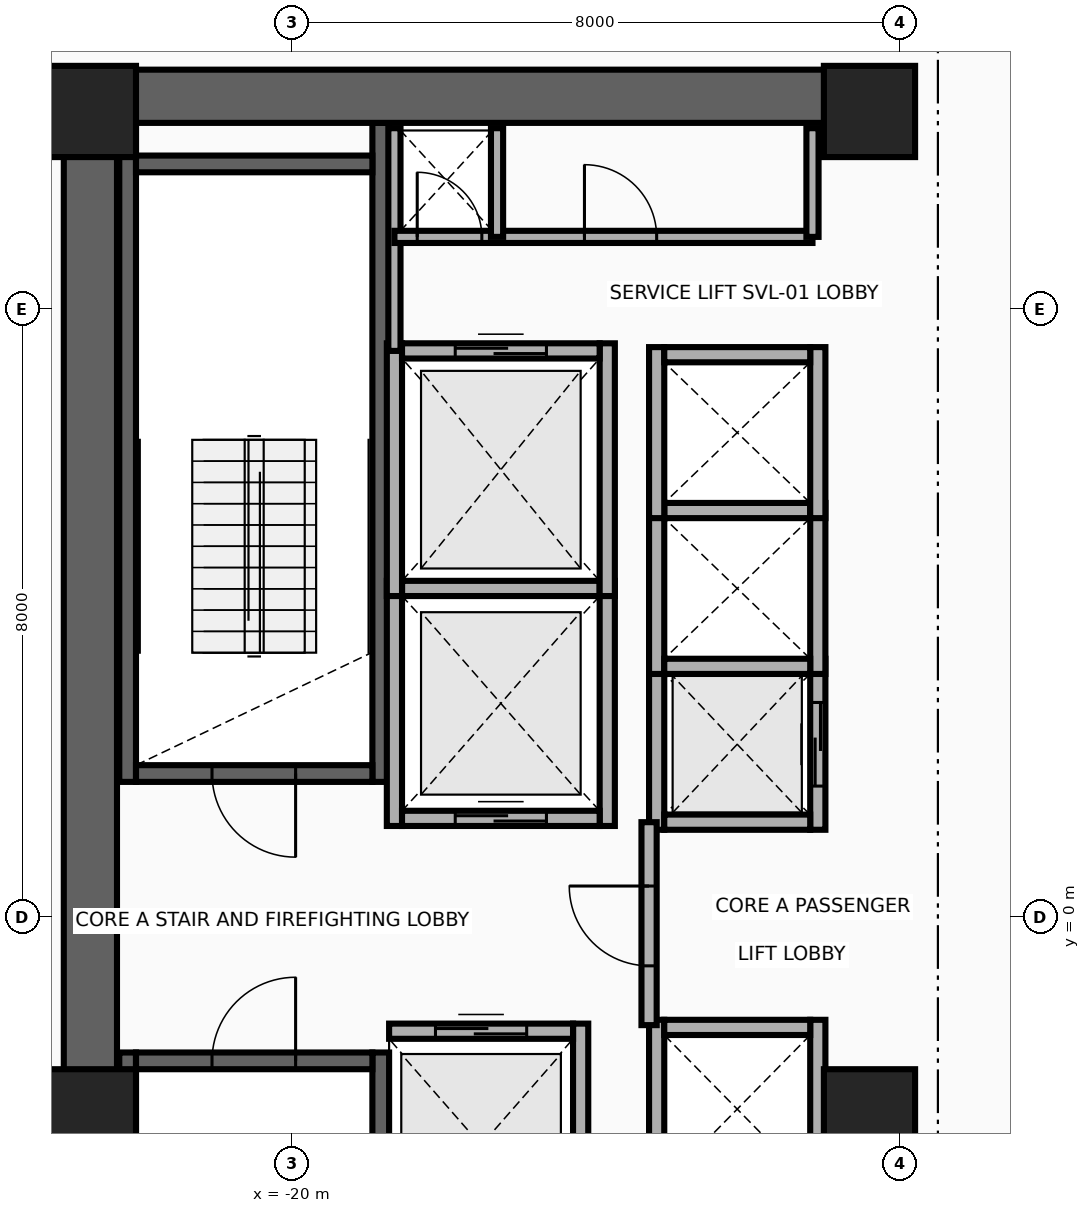
"""IFC4 building model, lengths in metres.
Left out: names, types, materials, properties, quantities, classifications, styles, units other than length and angle.
Written with IfcOpenShell. Run it as: python <this file> out.ifc"""

import sys

from ifc_helpers import new_model, si_unit, direction, frame, frame_2d, origin, origin_2d, place, context, subcontext, project, spatial, rectangle, extrude, source, transform, mapped, element, fill, save


model = new_model("IFC4")
c1 = context("Model", 3, precision=1e-05, world=origin(), true_north=direction((0.0, 1.0)))
c2 = subcontext(c1, "Body", "Model", "MODEL_VIEW")
j1 = project(units=[si_unit("LENGTHUNIT", "METRE"), si_unit("PLANEANGLEUNIT", "RADIAN")], contexts=[c1])
p1 = place(None, origin())
s1 = spatial("IfcSite", under=j1, at=p1, CompositionType="ELEMENT")
p2 = place(p1, origin())
s2 = spatial("IfcBuilding", under=s1, at=p2, CompositionType="ELEMENT")
p3 = place(p2, frame((0.0, 0.0, 142.7)))
s3 = spatial("IfcBuildingStorey", under=s2, at=p3, CompositionType="ELEMENT", Elevation=142.7)
for number, where, z_axis, x_axis in (
    (1, (-22.16, 1.78, 0.0), (0.0, 0.0, 1.0), (0.0, 1.0, 0.0)),
    (2, (-18.83, 1.78, 0.0), (0.0, 0.0, 1.0), (0.0, 1.0, 0.0)),
):
    element("IfcWall", number, at=place(p3, frame(where, z_axis=z_axis, x_axis=x_axis)), inside=s3, PredefinedType="SHEAR", context=c2, shape_type="SweptSolid", body=[
        extrude(rectangle(XDim=8.67, YDim=0.22, at=frame_2d((4.335, 0.0))), origin(), (0.0, 0.0, 1.0), 3.46),
    ])
p4 = place(p3, frame((-22.05, 1.89, 0.0), z_axis=(0.0, 0.0, 1.0), x_axis=(1.0, 0.0, 0.0)))
e3 = element("IfcWall", 3, at=p4, inside=s3, PredefinedType="SHEAR", context=c2, shape_type="SweptSolid", body=[
    extrude(rectangle(XDim=3.11, YDim=0.22, at=frame_2d((1.555, 0.0))), origin(), (0.0, 0.0, 1.0), 3.46),
])
p5 = place(p4, frame((1.0, 0.0, 0.0)))
e4 = element("IfcOpeningElement", 4, at=p5, cuts=e3, PredefinedType="OPENING", context=c2, shape_type="SweptSolid", body=[
    extrude(rectangle(XDim=1.1, YDim=2.15, at=frame_2d((0.55, 1.075))), frame((0.0, 0.125, 0.0), z_axis=(0.0, -1.0, 0.0), x_axis=(1.0, 0.0, 0.0)), (0.0, 0.0, 1.0), 0.25),
])
p6 = place(p3, frame((-22.05, 9.91, 0.0), z_axis=(0.0, 0.0, 1.0), x_axis=(1.0, 0.0, 0.0)))
e5 = element("IfcWall", 5, at=p6, inside=s3, PredefinedType="SHEAR", context=c2, shape_type="SweptSolid", body=[
    extrude(rectangle(XDim=3.11, YDim=0.22, at=frame_2d((1.555, 0.0))), origin(), (0.0, 0.0, 1.0), 3.46),
])
for number, where, z_axis, x_axis in (
    (6, (-22.16, -10.45, 0.0), (0.0, 0.0, 1.0), (0.0, 1.0, 0.0)),
    (7, (-18.83, -10.45, 0.0), (0.0, 0.0, 1.0), (0.0, 1.0, 0.0)),
):
    element("IfcWall", number, at=place(p3, frame(where, z_axis=z_axis, x_axis=x_axis)), inside=s3, PredefinedType="SHEAR", context=c2, shape_type="SweptSolid", body=[
        extrude(rectangle(XDim=8.67, YDim=0.22, at=frame_2d((4.335, 0.0))), origin(), (0.0, 0.0, 1.0), 3.46),
    ])
p7 = place(p3, frame((-22.05, -1.89, 0.0), z_axis=(0.0, 0.0, 1.0), x_axis=(1.0, 0.0, 0.0)))
e8 = element("IfcWall", 8, at=p7, inside=s3, PredefinedType="SHEAR", context=c2, shape_type="SweptSolid", body=[
    extrude(rectangle(XDim=3.11, YDim=0.22, at=frame_2d((1.555, 0.0))), origin(), (0.0, 0.0, 1.0), 3.46),
])
p8 = place(p7, frame((1.0, 0.0, 0.0)))
e9 = element("IfcOpeningElement", 9, at=p8, cuts=e8, PredefinedType="OPENING", context=c2, shape_type="SweptSolid", body=[
    extrude(rectangle(XDim=1.1, YDim=2.15, at=frame_2d((0.55, 1.075))), frame((0.0, 0.125, 0.0), z_axis=(0.0, -1.0, 0.0), x_axis=(1.0, 0.0, 0.0)), (0.0, 0.0, 1.0), 0.25),
])
p9 = place(p3, frame((-22.65, -11.15, 0.0), z_axis=(0.0, 0.0, 1.0), x_axis=(0.0, 1.0, 0.0)))
e10 = element("IfcWall", 10, at=p9, inside=s3, PredefinedType="SHEAR", context=c2, shape_type="SweptSolid", body=[
    extrude(rectangle(XDim=22.3, YDim=0.7, at=frame_2d((11.15, 0.0))), origin(), (0.0, 0.0, 1.0), 3.46),
])
p10 = place(p3, frame((-22.65, 10.8, 0.0), z_axis=(0.0, 0.0, 1.0), x_axis=(1.0, 0.0, 0.0)))
e11 = element("IfcWall", 11, at=p10, inside=s3, PredefinedType="SHEAR", context=c2, shape_type="SweptSolid", body=[
    extrude(rectangle(XDim=10.25, YDim=0.7, at=frame_2d((5.125, 0.0))), origin(), (0.0, 0.0, 1.0), 3.46),
])
m1 = source(origin(), c2, "Body", "SweptSolid", [
    extrude(rectangle(XDim=1.2, YDim=1.2, at=origin_2d()), origin(), (0.0, 0.0, 1.0), 3.7),
])
for number, where, z_axis, x_axis in (
    (12, (-22.65, -2.6, 0.0), (0.0, 0.0, 1.0), (1.0, 0.0, 0.0)),
    (13, (-12.4, -2.6, 0.0), (0.0, 0.0, 1.0), (1.0, 0.0, 0.0)),
    (14, (-22.65, 10.6, 0.0), (0.0, 0.0, 1.0), (1.0, 0.0, 0.0)),
    (15, (-12.4, 10.6, 0.0), (0.0, 0.0, 1.0), (1.0, 0.0, 0.0)),
):
    element("IfcColumn", number, at=place(p3, frame(where, z_axis=z_axis, x_axis=x_axis)), inside=s3, PredefinedType="COLUMN", context=c2, shape_type="MappedRepresentation", body=[
        mapped(m1, transform((0.0, 0.0, 0.0), x_axis=(1.0, 0.0, 0.0), y_axis=(0.0, 1.0, 0.0), z_axis=(0.0, 0.0, 1.0), scale=1.0)),
    ])
for number, where, z_axis, x_axis in (
    (16, (-18.65, 1.2, 0.0), (0.0, 0.0, 1.0), (0.0, 1.0, 0.0)),
    (17, (-15.85, 1.2, 0.0), (0.0, 0.0, 1.0), (0.0, 1.0, 0.0)),
):
    element("IfcWall", number, at=place(p3, frame(where, z_axis=z_axis, x_axis=x_axis)), inside=s3, PredefinedType="MOVABLE", context=c2, shape_type="SweptSolid", body=[
        extrude(rectangle(XDim=3.225, YDim=0.2, at=frame_2d((1.613, 0.0))), origin(), (0.0, 0.0, 1.0), 3.46),
    ])
p11 = place(p3, frame((-18.55, 1.3, 0.0), z_axis=(0.0, 0.0, 1.0), x_axis=(1.0, 0.0, 0.0)))
e18 = element("IfcWall", 18, at=p11, inside=s3, PredefinedType="MOVABLE", context=c2, shape_type="SweptSolid", body=[
    extrude(rectangle(XDim=2.6, YDim=0.2, at=frame_2d((1.3, 0.0))), origin(), (0.0, 0.0, 1.0), 3.46),
])
p12 = place(p11, frame((0.7, 0.0, 0.0)))
e19 = element("IfcOpeningElement", 19, at=p12, cuts=e18, PredefinedType="OPENING", context=c2, shape_type="SweptSolid", body=[
    extrude(rectangle(XDim=1.2, YDim=2.1, at=frame_2d((0.6, 1.05))), frame((0.0, 0.115, 0.0), z_axis=(0.0, -1.0, 0.0), x_axis=(1.0, 0.0, 0.0)), (0.0, 0.0, 1.0), 0.23),
])
p13 = place(p3, frame((-18.55, 4.325, 0.0), z_axis=(0.0, 0.0, 1.0), x_axis=(1.0, 0.0, 0.0)))
e20 = element("IfcWall", 20, at=p13, inside=s3, PredefinedType="MOVABLE", context=c2, shape_type="SweptSolid", body=[
    extrude(rectangle(XDim=2.6, YDim=0.2, at=frame_2d((1.3, 0.0))), origin(), (0.0, 0.0, 1.0), 3.46),
])
p14 = place(p3, frame((-16.2, -4.6, 0.0), z_axis=(0.0, 0.0, 1.0), x_axis=(0.0, 1.0, 0.0)))
e21 = element("IfcWall", 21, at=p14, inside=s3, PredefinedType="MOVABLE", context=c2, shape_type="SweptSolid", body=[
    extrude(rectangle(XDim=3.2, YDim=0.2, at=frame_2d((1.6, 0.0))), origin(), (0.0, 0.0, 1.0), 3.46),
])
p15 = place(p3, frame((-18.72, -1.5, 0.0), z_axis=(0.0, 0.0, 1.0), x_axis=(1.0, 0.0, 0.0)))
e22 = element("IfcWall", 22, at=p15, inside=s3, PredefinedType="MOVABLE", context=c2, shape_type="SweptSolid", body=[
    extrude(rectangle(XDim=2.42, YDim=0.2, at=frame_2d((1.21, 0.0))), origin(), (0.0, 0.0, 1.0), 3.46),
])
p16 = place(p15, frame((0.61, 0.0, 0.0)))
e23 = element("IfcOpeningElement", 23, at=p16, cuts=e22, PredefinedType="OPENING", context=c2, shape_type="SweptSolid", body=[
    extrude(rectangle(XDim=1.2, YDim=2.1, at=frame_2d((0.6, 1.05))), frame((0.0, 0.115, 0.0), z_axis=(0.0, -1.0, 0.0), x_axis=(1.0, 0.0, 0.0)), (0.0, 0.0, 1.0), 0.23),
])
for number, where, z_axis, x_axis in (
    (24, (-18.65, 4.225, 0.0), (0.0, 0.0, 1.0), (0.0, 1.0, 0.0)),
    (25, (-15.85, 4.225, 0.0), (0.0, 0.0, 1.0), (0.0, 1.0, 0.0)),
):
    element("IfcWall", number, at=place(p3, frame(where, z_axis=z_axis, x_axis=x_axis)), inside=s3, PredefinedType="MOVABLE", context=c2, shape_type="SweptSolid", body=[
        extrude(rectangle(XDim=3.325, YDim=0.2, at=frame_2d((1.663, 0.0))), origin(), (0.0, 0.0, 1.0), 3.46),
    ])
p17 = place(p3, frame((-18.55, 7.45, 0.0), z_axis=(0.0, 0.0, 1.0), x_axis=(1.0, 0.0, 0.0)))
e26 = element("IfcWall", 26, at=p17, inside=s3, PredefinedType="MOVABLE", context=c2, shape_type="SweptSolid", body=[
    extrude(rectangle(XDim=2.6, YDim=0.2, at=frame_2d((1.3, 0.0))), origin(), (0.0, 0.0, 1.0), 3.46),
])
p18 = place(p17, frame((0.7, 0.0, 0.0)))
e27 = element("IfcOpeningElement", 27, at=p18, cuts=e26, PredefinedType="OPENING", context=c2, shape_type="SweptSolid", body=[
    extrude(rectangle(XDim=1.2, YDim=2.1, at=frame_2d((0.6, 1.05))), frame((0.0, 0.115, 0.0), z_axis=(0.0, -1.0, 0.0), x_axis=(1.0, 0.0, 0.0)), (0.0, 0.0, 1.0), 0.23),
])
p19 = place(p3, frame((-15.2, 1.15, 0.0), z_axis=(0.0, 0.0, 1.0), x_axis=(0.0, 1.0, 0.0)))
e28 = element("IfcWall", 28, at=p19, inside=s3, PredefinedType="MOVABLE", context=c2, shape_type="SweptSolid", body=[
    extrude(rectangle(XDim=2.25, YDim=0.2, at=frame_2d((1.125, 0.0))), origin(), (0.0, 0.0, 1.0), 3.46),
])
p20 = place(p3, frame((-13.08, 1.15, 0.0), z_axis=(0.0, 0.0, 1.0), x_axis=(0.0, 1.0, 0.0)))
e29 = element("IfcWall", 29, at=p20, inside=s3, PredefinedType="MOVABLE", context=c2, shape_type="SweptSolid", body=[
    extrude(rectangle(XDim=2.25, YDim=0.2, at=frame_2d((1.125, 0.0))), origin(), (0.0, 0.0, 1.0), 3.46),
])
p21 = place(p20, frame((0.575, 0.0, 0.0)))
e30 = element("IfcOpeningElement", 30, at=p21, cuts=e29, PredefinedType="OPENING", context=c2, shape_type="SweptSolid", body=[
    extrude(rectangle(XDim=1.1, YDim=2.1, at=frame_2d((0.55, 1.05))), frame((0.0, 0.115, 0.0), z_axis=(0.0, -1.0, 0.0), x_axis=(1.0, 0.0, 0.0)), (0.0, 0.0, 1.0), 0.23),
])
p22 = place(p3, frame((-15.1, 1.25, 0.0), z_axis=(0.0, 0.0, 1.0), x_axis=(1.0, 0.0, 0.0)))
e31 = element("IfcWall", 31, at=p22, inside=s3, PredefinedType="MOVABLE", context=c2, shape_type="SweptSolid", body=[
    extrude(rectangle(XDim=1.92, YDim=0.2, at=frame_2d((0.96, 0.0))), origin(), (0.0, 0.0, 1.0), 3.46),
])
for number, where, z_axis, x_axis in (
    (32, (-15.2, 3.2, 0.0), (0.0, 0.0, 1.0), (0.0, 1.0, 0.0)),
    (33, (-13.08, 3.2, 0.0), (0.0, 0.0, 1.0), (0.0, 1.0, 0.0)),
):
    element("IfcWall", number, at=place(p3, frame(where, z_axis=z_axis, x_axis=x_axis)), inside=s3, PredefinedType="MOVABLE", context=c2, shape_type="SweptSolid", body=[
        extrude(rectangle(XDim=2.25, YDim=0.2, at=frame_2d((1.125, 0.0))), origin(), (0.0, 0.0, 1.0), 3.46),
    ])
for number, where, z_axis, x_axis in (
    (34, (-15.1, 3.3, 0.0), (0.0, 0.0, 1.0), (1.0, 0.0, 0.0)),
    (35, (-15.1, 5.35, 0.0), (0.0, 0.0, 1.0), (1.0, 0.0, 0.0)),
):
    element("IfcWall", number, at=place(p3, frame(where, z_axis=z_axis, x_axis=x_axis)), inside=s3, PredefinedType="MOVABLE", context=c2, shape_type="SweptSolid", body=[
        extrude(rectangle(XDim=1.92, YDim=0.2, at=frame_2d((0.96, 0.0))), origin(), (0.0, 0.0, 1.0), 3.46),
    ])
for number, where, z_axis, x_axis in (
    (36, (-15.2, 5.25, 0.0), (0.0, 0.0, 1.0), (0.0, 1.0, 0.0)),
    (37, (-13.08, 5.25, 0.0), (0.0, 0.0, 1.0), (0.0, 1.0, 0.0)),
):
    element("IfcWall", number, at=place(p3, frame(where, z_axis=z_axis, x_axis=x_axis)), inside=s3, PredefinedType="MOVABLE", context=c2, shape_type="SweptSolid", body=[
        extrude(rectangle(XDim=2.25, YDim=0.2, at=frame_2d((1.125, 0.0))), origin(), (0.0, 0.0, 1.0), 3.46),
    ])
p23 = place(p3, frame((-15.1, 7.4, 0.0), z_axis=(0.0, 0.0, 1.0), x_axis=(1.0, 0.0, 0.0)))
e38 = element("IfcWall", 38, at=p23, inside=s3, PredefinedType="MOVABLE", context=c2, shape_type="SweptSolid", body=[
    extrude(rectangle(XDim=1.92, YDim=0.2, at=frame_2d((0.96, 0.0))), origin(), (0.0, 0.0, 1.0), 3.46),
])
for number, where, z_axis, x_axis in (
    (39, (-15.2, -3.7, 0.0), (0.0, 0.0, 1.0), (0.0, 1.0, 0.0)),
    (40, (-13.08, -3.7, 0.0), (0.0, 0.0, 1.0), (0.0, 1.0, 0.0)),
):
    element("IfcWall", number, at=place(p3, frame(where, z_axis=z_axis, x_axis=x_axis)), inside=s3, PredefinedType="MOVABLE", context=c2, shape_type="SweptSolid", body=[
        extrude(rectangle(XDim=2.35, YDim=0.2, at=frame_2d((1.175, 0.0))), origin(), (0.0, 0.0, 1.0), 3.46),
    ])
p24 = place(p3, frame((-15.1, -1.45, 0.0), z_axis=(0.0, 0.0, 1.0), x_axis=(1.0, 0.0, 0.0)))
e41 = element("IfcWall", 41, at=p24, inside=s3, PredefinedType="MOVABLE", context=c2, shape_type="SweptSolid", body=[
    extrude(rectangle(XDim=1.92, YDim=0.2, at=frame_2d((0.96, 0.0))), origin(), (0.0, 0.0, 1.0), 3.46),
])
p25 = place(p3, frame((-15.3, -1.42, 0.0), z_axis=(0.0, 0.0, 1.0), x_axis=(0.0, 1.0, 0.0)))
e42 = element("IfcWall", 42, at=p25, inside=s3, PredefinedType="PARTITIONING", context=c2, shape_type="SweptSolid", body=[
    extrude(rectangle(XDim=2.67, YDim=0.2, at=frame_2d((1.335, 0.0))), origin(), (0.0, 0.0, 1.0), 3.46),
])
p26 = place(p25, frame((0.78, 0.0, 0.0)))
e43 = element("IfcOpeningElement", 43, at=p26, cuts=e42, PredefinedType="OPENING", context=c2, shape_type="SweptSolid", body=[
    extrude(rectangle(XDim=1.05, YDim=2.15, at=frame_2d((0.525, 1.075))), frame((0.0, 0.115, 0.0), z_axis=(0.0, -1.0, 0.0), x_axis=(1.0, 0.0, 0.0)), (0.0, 0.0, 1.0), 0.23),
])
p27 = place(p3, frame((-18.65, 7.45, 0.0), z_axis=(0.0, 0.0, 1.0), x_axis=(0.0, 1.0, 0.0)))
e44 = element("IfcWall", 44, at=p27, inside=s3, PredefinedType="PARTITIONING", context=c2, shape_type="SweptSolid", body=[
    extrude(rectangle(XDim=2.93, YDim=0.16, at=frame_2d((1.465, 0.0))), origin(), (0.0, 0.0, 1.0), 3.46),
])
p28 = place(p3, frame((-18.65, 8.95, 0.0), z_axis=(0.0, 0.0, 1.0), x_axis=(1.0, 0.0, 0.0)))
e45 = element("IfcWall", 45, at=p28, inside=s3, PredefinedType="PARTITIONING", context=c2, shape_type="SweptSolid", body=[
    extrude(rectangle(XDim=5.5, YDim=0.16, at=frame_2d((2.75, 0.0))), origin(), (0.0, 0.0, 1.0), 3.46),
])
p29 = place(p28, frame((0.3, 0.0, 0.0)))
e46 = element("IfcOpeningElement", 46, at=p29, cuts=e45, PredefinedType="OPENING", context=c2, shape_type="SweptSolid", body=[
    extrude(rectangle(XDim=0.85, YDim=2.05, at=frame_2d((0.425, 1.025))), frame((0.0, 0.095, 0.0), z_axis=(0.0, -1.0, 0.0), x_axis=(1.0, 0.0, 0.0)), (0.0, 0.0, 1.0), 0.19),
])
p30 = place(p28, frame((2.5, 0.0, 0.0)))
e47 = element("IfcOpeningElement", 47, at=p30, cuts=e45, PredefinedType="OPENING", context=c2, shape_type="SweptSolid", body=[
    extrude(rectangle(XDim=0.95, YDim=2.15, at=frame_2d((0.475, 1.075))), frame((0.0, 0.095, 0.0), z_axis=(0.0, -1.0, 0.0), x_axis=(1.0, 0.0, 0.0)), (0.0, 0.0, 1.0), 0.19),
])
for number, where, z_axis, x_axis in (
    (48, (-13.15, 8.95, 0.0), (0.0, 0.0, 1.0), (0.0, 1.0, 0.0)),
    (49, (-17.3, 8.95, 0.0), (0.0, 0.0, 1.0), (0.0, 1.0, 0.0)),
):
    element("IfcWall", number, at=place(p3, frame(where, z_axis=z_axis, x_axis=x_axis)), inside=s3, PredefinedType="PARTITIONING", context=c2, shape_type="SweptSolid", body=[
        extrude(rectangle(XDim=1.43, YDim=0.16, at=frame_2d((0.715, 0.0))), origin(), (0.0, 0.0, 1.0), 3.46),
    ])
p31 = place(p12, origin())
e50 = element("IfcDoor", 50, at=p31, inside=s3, OperationType="DOUBLE_DOOR_SLIDING", PredefinedType="DOOR", context=c2, shape_type="SweptSolid", body=[
    extrude(rectangle(XDim=1.2, YDim=2.1, at=frame_2d((0.6, 1.05))), frame((0.0, 0.025, 0.0), z_axis=(0.0, -1.0, 0.0), x_axis=(1.0, 0.0, 0.0)), (0.0, 0.0, 1.0), 0.05),
])
fill(e19, e50)
p32 = place(p16, origin())
e51 = element("IfcDoor", 51, at=p32, inside=s3, OperationType="DOUBLE_DOOR_SLIDING", PredefinedType="DOOR", context=c2, shape_type="SweptSolid", body=[
    extrude(rectangle(XDim=1.2, YDim=2.1, at=frame_2d((0.6, 1.05))), frame((0.0, 0.025, 0.0), z_axis=(0.0, -1.0, 0.0), x_axis=(1.0, 0.0, 0.0)), (0.0, 0.0, 1.0), 0.05),
])
fill(e23, e51)
p33 = place(p18, origin())
e52 = element("IfcDoor", 52, at=p33, inside=s3, OperationType="DOUBLE_DOOR_SLIDING", PredefinedType="DOOR", context=c2, shape_type="SweptSolid", body=[
    extrude(rectangle(XDim=1.2, YDim=2.1, at=frame_2d((0.6, 1.05))), frame((0.0, 0.025, 0.0), z_axis=(0.0, -1.0, 0.0), x_axis=(1.0, 0.0, 0.0)), (0.0, 0.0, 1.0), 0.05),
])
fill(e27, e52)
p34 = place(p21, origin())
e53 = element("IfcDoor", 53, at=p34, inside=s3, OperationType="DOUBLE_DOOR_SLIDING", PredefinedType="DOOR", context=c2, shape_type="SweptSolid", body=[
    extrude(rectangle(XDim=1.1, YDim=2.1, at=frame_2d((0.55, 1.05))), frame((0.0, 0.025, 0.0), z_axis=(0.0, -1.0, 0.0), x_axis=(1.0, 0.0, 0.0)), (0.0, 0.0, 1.0), 0.05),
])
fill(e30, e53)
p35 = place(p26, origin())
e54 = element("IfcDoor", 54, at=p35, inside=s3, OperationType="SINGLE_SWING_RIGHT", PredefinedType="DOOR", context=c2, shape_type="SweptSolid", body=[
    extrude(rectangle(XDim=1.05, YDim=2.15, at=frame_2d((0.525, 1.075))), frame((0.0, 0.025, 0.0), z_axis=(0.0, -1.0, 0.0), x_axis=(1.0, 0.0, 0.0)), (0.0, 0.0, 1.0), 0.05),
])
fill(e43, e54)
p36 = place(p5, frame((1.1, 0.0, 0.0), z_axis=(0.0, 0.0, 1.0), x_axis=(-1.0, 0.0, 0.0)))
e55 = element("IfcDoor", 55, at=p36, inside=s3, OperationType="SINGLE_SWING_LEFT", PredefinedType="DOOR", context=c2, shape_type="SweptSolid", body=[
    extrude(rectangle(XDim=1.1, YDim=2.15, at=frame_2d((0.55, 1.075))), frame((0.0, 0.025, 0.0), z_axis=(0.0, -1.0, 0.0), x_axis=(1.0, 0.0, 0.0)), (0.0, 0.0, 1.0), 0.05),
])
fill(e4, e55)
p37 = place(p8, origin())
e56 = element("IfcDoor", 56, at=p37, inside=s3, OperationType="SINGLE_SWING_RIGHT", PredefinedType="DOOR", context=c2, shape_type="SweptSolid", body=[
    extrude(rectangle(XDim=1.1, YDim=2.15, at=frame_2d((0.55, 1.075))), frame((0.0, 0.025, 0.0), z_axis=(0.0, -1.0, 0.0), x_axis=(1.0, 0.0, 0.0)), (0.0, 0.0, 1.0), 0.05),
])
fill(e9, e56)
p38 = place(p29, origin())
e57 = element("IfcDoor", 57, at=p38, inside=s3, OperationType="SINGLE_SWING_LEFT", PredefinedType="DOOR", context=c2, shape_type="SweptSolid", body=[
    extrude(rectangle(XDim=0.85, YDim=2.05, at=frame_2d((0.425, 1.025))), frame((0.0, 0.025, 0.0), z_axis=(0.0, -1.0, 0.0), x_axis=(1.0, 0.0, 0.0)), (0.0, 0.0, 1.0), 0.05),
])
fill(e46, e57)
p39 = place(p30, origin())
e58 = element("IfcDoor", 58, at=p39, inside=s3, OperationType="SINGLE_SWING_RIGHT", PredefinedType="DOOR", context=c2, shape_type="SweptSolid", body=[
    extrude(rectangle(XDim=0.95, YDim=2.15, at=frame_2d((0.475, 1.075))), frame((0.0, 0.025, 0.0), z_axis=(0.0, -1.0, 0.0), x_axis=(1.0, 0.0, 0.0)), (0.0, 0.0, 1.0), 0.05),
])
fill(e47, e58)
save(model, sys.argv[1])
